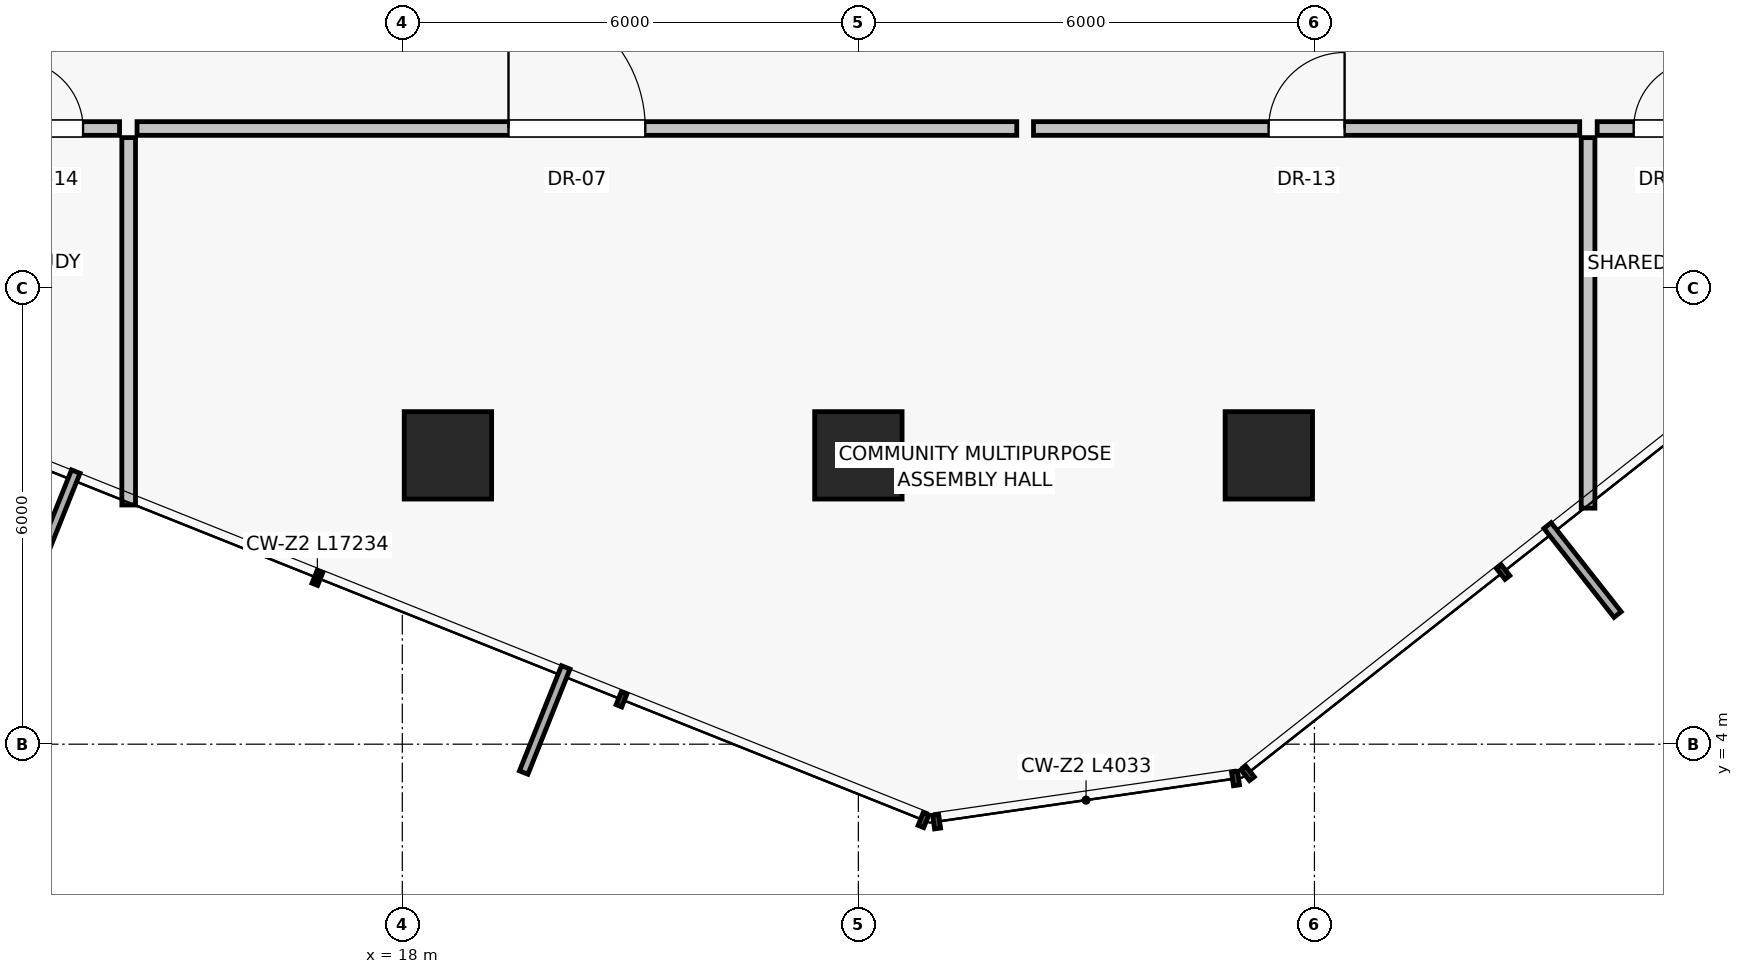
"""IFC4 building model, lengths in metres.
Left out: names, types, materials, properties, quantities, classifications, styles, units other than length and angle.
Written with IfcOpenShell. Run it as: python <this file> out.ifc"""

import sys

from ifc_helpers import new_model, si_unit, direction, frame, frame_2d, origin, origin_2d, place, context, subcontext, project, spatial, rectangle, extrude, source, transform, mapped, element, fill, save


model = new_model("IFC4")
c1 = context("Model", 3, precision=1e-05, world=origin(), true_north=direction((0.0, 1.0)))
c2 = subcontext(c1, "Body", "Model", "MODEL_VIEW")
j1 = project(units=[si_unit("LENGTHUNIT", "METRE"), si_unit("PLANEANGLEUNIT", "RADIAN")], contexts=[c1])
p1 = place(None, origin())
s1 = spatial("IfcSite", under=j1, at=p1, CompositionType="ELEMENT")
p2 = place(p1, origin())
s2 = spatial("IfcBuilding", under=s1, at=p2, CompositionType="ELEMENT")
p3 = place(p2, frame((0.0, 0.0, 155.5)))
s3 = spatial("IfcBuildingStorey", under=s2, at=p3, CompositionType="ELEMENT", Elevation=155.5)
for number, where, z_axis, x_axis in (
    (1, (18.6, 7.8, 0.0), (0.0, 0.0, 1.0), (1.0, 0.0, 0.0)),
    (2, (24.0, 7.8, 0.0), (0.0, 0.0, 1.0), (1.0, 0.0, 0.0)),
    (3, (29.4, 7.8, 0.0), (0.0, 0.0, 1.0), (1.0, 0.0, 0.0)),
):
    element("IfcColumn", number, at=place(p3, frame(where, z_axis=z_axis, x_axis=x_axis)), inside=s3, PredefinedType="COLUMN", context=c2, shape_type="SweptSolid", body=[
        extrude(rectangle(XDim=1.15, YDim=1.15, at=origin_2d()), origin(), (0.0, 0.0, 1.0), 3.25),
    ])
p4 = place(p3, frame((14.4, 11.98, 0.0), z_axis=(0.0, 0.0, 1.0), x_axis=(0.0, -1.0, 0.0)))
e4 = element("IfcWall", 4, at=p4, inside=s3, PredefinedType="PARTITIONING", context=c2, shape_type="SweptSolid", body=[
    extrude(rectangle(XDim=4.833, YDim=0.18, at=frame_2d((2.417, 0.0))), origin(), (0.0, 0.0, 1.0), 2.97),
])
p5 = place(p3, frame((33.6, 11.98, 0.0), z_axis=(0.0, 0.0, 1.0), x_axis=(0.0, -1.0, 0.0)))
e5 = element("IfcWall", 5, at=p5, inside=s3, PredefinedType="PARTITIONING", context=c2, shape_type="SweptSolid", body=[
    extrude(rectangle(XDim=4.875, YDim=0.18, at=frame_2d((2.437, 0.0))), origin(), (0.0, 0.0, 1.0), 2.97),
])
p6 = place(p3, frame((14.51, 12.1, 0.0), z_axis=(0.0, 0.0, 1.0), x_axis=(1.0, 0.0, 0.0)))
e6 = element("IfcWall", 6, at=p6, inside=s3, PredefinedType="PARTITIONING", context=c2, shape_type="SweptSolid", body=[
    extrude(rectangle(XDim=11.574, YDim=0.18, at=frame_2d((5.787, 0.0))), origin(), (0.0, 0.0, 1.0), 2.55),
])
p7 = place(p6, frame((4.887, 0.0, 0.0)))
e7 = element("IfcOpeningElement", 7, at=p7, cuts=e6, PredefinedType="OPENING", context=c2, shape_type="SweptSolid", body=[
    extrude(rectangle(XDim=1.8, YDim=2.25, at=frame_2d((0.9, 1.125))), frame((0.0, 0.1, 0.0), z_axis=(0.0, -1.0, 0.0), x_axis=(1.0, 0.0, 0.0)), (0.0, 0.0, 1.0), 0.2),
])
p8 = place(p3, frame((26.304, 12.1, 0.0), z_axis=(0.0, 0.0, 1.0), x_axis=(1.0, 0.0, 0.0)))
e8 = element("IfcWall", 8, at=p8, inside=s3, PredefinedType="PARTITIONING", context=c2, shape_type="SweptSolid", body=[
    extrude(rectangle(XDim=7.186, YDim=0.18, at=frame_2d((3.593, 0.0))), origin(), (0.0, 0.0, 1.0), 2.55),
])
p9 = place(p8, frame((3.093, 0.0, 0.0)))
e9 = element("IfcOpeningElement", 9, at=p9, cuts=e8, PredefinedType="OPENING", context=c2, shape_type="SweptSolid", body=[
    extrude(rectangle(XDim=1.0, YDim=2.01, at=frame_2d((0.5, 1.005))), frame((0.0, 0.1, 0.0), z_axis=(0.0, -1.0, 0.0), x_axis=(1.0, 0.0, 0.0)), (0.0, 0.0, 1.0), 0.2),
])
p10 = place(p3, frame((12.42, 12.1, 0.0), z_axis=(0.0, 0.0, 1.0), x_axis=(1.0, 0.0, 0.0)))
e10 = element("IfcWall", 10, at=p10, inside=s3, PredefinedType="PARTITIONING", context=c2, shape_type="SweptSolid", body=[
    extrude(rectangle(XDim=1.86, YDim=0.18, at=frame_2d((0.93, 0.0))), origin(), (0.0, 0.0, 1.0), 2.97),
])
p11 = place(p10, frame((0.48, 0.0, 0.0)))
e11 = element("IfcOpeningElement", 11, at=p11, cuts=e10, PredefinedType="OPENING", context=c2, shape_type="SweptSolid", body=[
    extrude(rectangle(XDim=0.9, YDim=2.01, at=frame_2d((0.45, 1.005))), frame((0.0, 0.1, 0.0), z_axis=(0.0, -1.0, 0.0), x_axis=(1.0, 0.0, 0.0)), (0.0, 0.0, 1.0), 0.2),
])
p12 = place(p3, frame((33.72, 12.1, 0.0), z_axis=(0.0, 0.0, 1.0), x_axis=(1.0, 0.0, 0.0)))
e12 = element("IfcWall", 12, at=p12, inside=s3, PredefinedType="PARTITIONING", context=c2, shape_type="SweptSolid", body=[
    extrude(rectangle(XDim=1.86, YDim=0.18, at=frame_2d((0.93, 0.0))), origin(), (0.0, 0.0, 1.0), 2.97),
])
p13 = place(p12, frame((0.48, 0.0, 0.0)))
e13 = element("IfcOpeningElement", 13, at=p13, cuts=e12, PredefinedType="OPENING", context=c2, shape_type="SweptSolid", body=[
    extrude(rectangle(XDim=0.9, YDim=2.01, at=frame_2d((0.45, 1.005))), frame((0.0, 0.1, 0.0), z_axis=(0.0, -1.0, 0.0), x_axis=(1.0, 0.0, 0.0)), (0.0, 0.0, 1.0), 0.2),
])
m1 = source(origin(), c2, "Body", "SweptSolid", [
    extrude(rectangle(XDim=1.8, YDim=2.25, at=frame_2d((0.9, 1.125))), frame((0.0, 0.025, 0.0), z_axis=(0.0, -1.0, 0.0), x_axis=(1.0, 0.0, 0.0)), (0.0, 0.0, 1.0), 0.05),
])
p14 = place(p7, origin())
e14 = element("IfcDoor", 14, at=p14, inside=s3, OperationType="SINGLE_SWING_LEFT", PredefinedType="DOOR", context=c2, shape_type="MappedRepresentation", body=[
    mapped(m1, transform((0.0, 0.0, 0.0), scale=1.0)),
])
fill(e7, e14)
m2 = source(origin(), c2, "Body", "SweptSolid", [
    extrude(rectangle(XDim=1.0, YDim=2.01, at=frame_2d((0.5, 1.005))), frame((0.0, 0.025, 0.0), z_axis=(0.0, -1.0, 0.0), x_axis=(1.0, 0.0, 0.0)), (0.0, 0.0, 1.0), 0.05),
])
p15 = place(p9, origin())
e15 = element("IfcDoor", 15, at=p15, inside=s3, OperationType="SINGLE_SWING_RIGHT", PredefinedType="DOOR", context=c2, shape_type="MappedRepresentation", body=[
    mapped(m2, transform((0.0, 0.0, 0.0), scale=1.0)),
])
fill(e9, e15)
m3 = source(origin(), c2, "Body", "SweptSolid", [
    extrude(rectangle(XDim=0.9, YDim=2.01, at=frame_2d((0.45, 1.005))), frame((0.0, 0.025, 0.0), z_axis=(0.0, -1.0, 0.0), x_axis=(1.0, 0.0, 0.0)), (0.0, 0.0, 1.0), 0.05),
])
p16 = place(p11, origin())
e16 = element("IfcDoor", 16, at=p16, inside=s3, OperationType="SINGLE_SWING_LEFT", PredefinedType="DOOR", context=c2, shape_type="MappedRepresentation", body=[
    mapped(m3, transform((0.0, 0.0, 0.0), scale=1.0)),
])
fill(e11, e16)
p17 = place(p13, origin())
e17 = element("IfcDoor", 17, at=p17, inside=s3, OperationType="SINGLE_SWING_RIGHT", PredefinedType="DOOR", context=c2, shape_type="MappedRepresentation", body=[
    mapped(m3, transform((0.0, 0.0, 0.0), scale=1.0)),
])
fill(e13, e17)
save(model, sys.argv[1])
